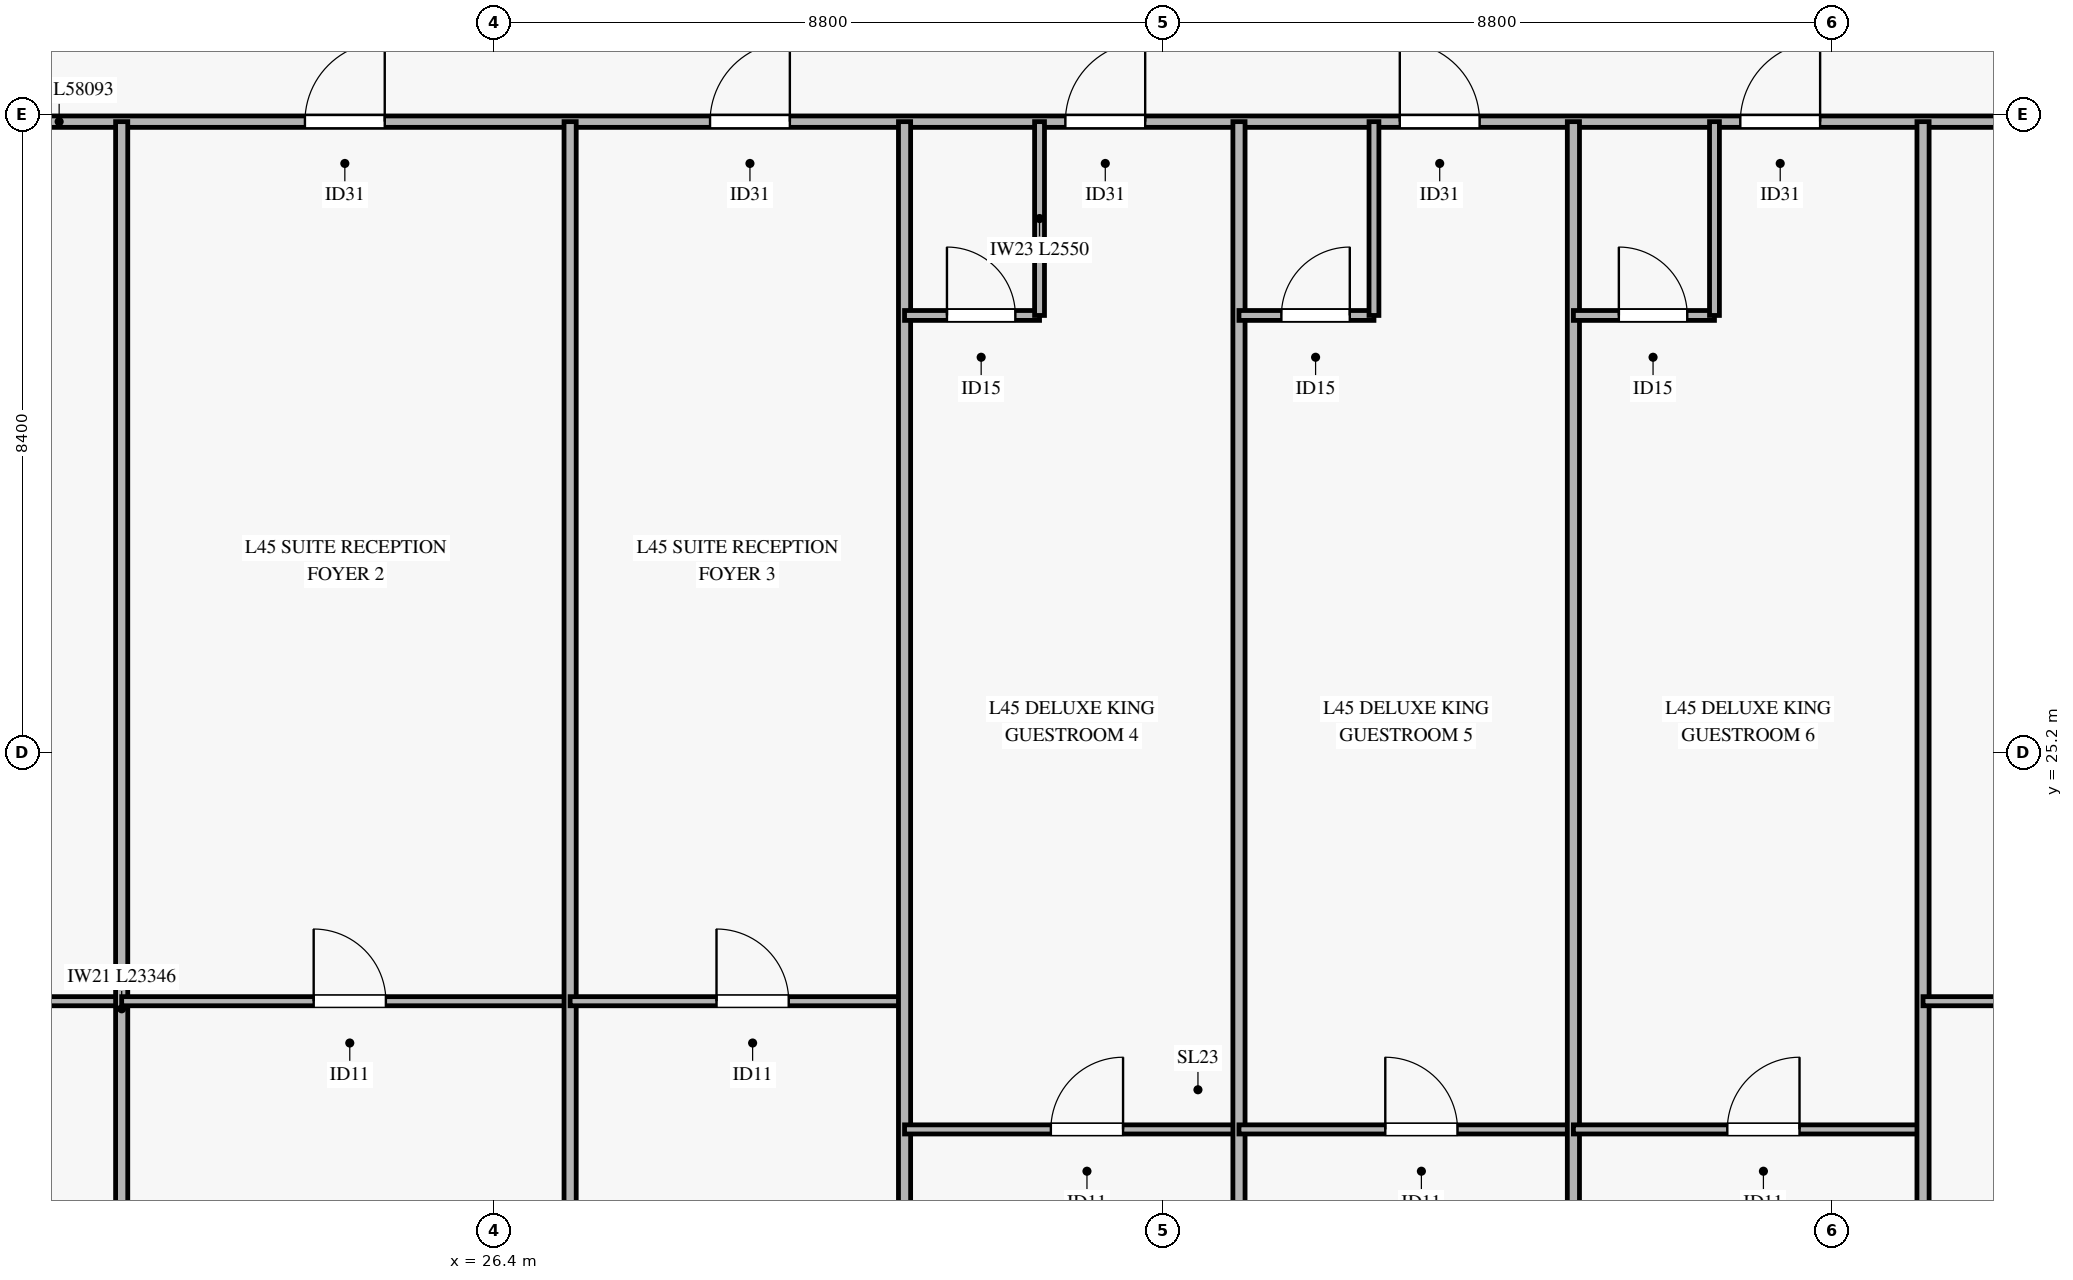
"""IFC4 building model, lengths in metres.
Left out: names, types, materials, properties, quantities, classifications, styles, units other than length and angle.
Written with IfcOpenShell. Run it as: python <this file> out.ifc"""

import sys

from ifc_helpers import new_model, si_unit, direction, frame, frame_2d, origin, place, context, subcontext, project, spatial, rectangle, extrude, source, transform, mapped, element, fill, save


model = new_model("IFC4")
c1 = context("Model", 3, precision=1e-05, world=origin(), true_north=direction((0.0, 1.0)))
c2 = subcontext(c1, "Body", "Model", "MODEL_VIEW")
j1 = project(units=[si_unit("LENGTHUNIT", "METRE"), si_unit("PLANEANGLEUNIT", "RADIAN")], contexts=[c1])
p1 = place(None, origin())
s1 = spatial("IfcSite", under=j1, at=p1, CompositionType="ELEMENT")
p2 = place(p1, origin())
s2 = spatial("IfcBuilding", under=s1, at=p2, CompositionType="ELEMENT")
p3 = place(p2, frame((0.0, 0.0, 180.7)))
s3 = spatial("IfcBuildingStorey", under=s2, at=p3, CompositionType="ELEMENT", Elevation=180.7)
p4 = place(p3, frame((6.154, 33.5, 0.0), z_axis=(0.0, 0.0, 1.0), x_axis=(1.0, 0.0, 0.0)))
e1 = element("IfcWall", 1, at=p4, inside=s3, PredefinedType="PARTITIONING", context=c2, shape_type="SweptSolid", body=[
    extrude(rectangle(XDim=58.093, YDim=0.15, at=frame_2d((29.046, 0.0))), origin(), (0.0, 0.0, 1.0), 2.455),
])
p5 = place(p4, frame((6.125, 0.0, 0.0)))
e2 = element("IfcOpeningElement", 2, at=p5, cuts=e1, PredefinedType="OPENING", context=c2, shape_type="SweptSolid", body=[
    extrude(rectangle(XDim=1.05, YDim=2.15, at=frame_2d((0.525, 1.075))), frame((0.0, 0.085, 0.0), z_axis=(0.0, -1.0, 0.0), x_axis=(1.0, 0.0, 0.0)), (0.0, 0.0, 1.0), 0.17),
])
p6 = place(p4, frame((17.757, 0.0, 0.0)))
e3 = element("IfcOpeningElement", 3, at=p6, cuts=e1, PredefinedType="OPENING", context=c2, shape_type="SweptSolid", body=[
    extrude(rectangle(XDim=1.05, YDim=2.15, at=frame_2d((0.525, 1.075))), frame((0.0, 0.085, 0.0), z_axis=(0.0, -1.0, 0.0), x_axis=(1.0, 0.0, 0.0)), (0.0, 0.0, 1.0), 0.17),
])
p7 = place(p4, frame((23.087, 0.0, 0.0)))
e4 = element("IfcOpeningElement", 4, at=p7, cuts=e1, PredefinedType="OPENING", context=c2, shape_type="SweptSolid", body=[
    extrude(rectangle(XDim=1.05, YDim=2.15, at=frame_2d((0.525, 1.075))), frame((0.0, 0.085, 0.0), z_axis=(0.0, -1.0, 0.0), x_axis=(1.0, 0.0, 0.0)), (0.0, 0.0, 1.0), 0.17),
])
p8 = place(p4, frame((27.762, 0.0, 0.0)))
e5 = element("IfcOpeningElement", 5, at=p8, cuts=e1, PredefinedType="OPENING", context=c2, shape_type="SweptSolid", body=[
    extrude(rectangle(XDim=1.05, YDim=2.15, at=frame_2d((0.525, 1.075))), frame((0.0, 0.085, 0.0), z_axis=(0.0, -1.0, 0.0), x_axis=(1.0, 0.0, 0.0)), (0.0, 0.0, 1.0), 0.17),
])
p9 = place(p4, frame((32.162, 0.0, 0.0)))
e6 = element("IfcOpeningElement", 6, at=p9, cuts=e1, PredefinedType="OPENING", context=c2, shape_type="SweptSolid", body=[
    extrude(rectangle(XDim=1.05, YDim=2.15, at=frame_2d((0.525, 1.075))), frame((0.0, 0.085, 0.0), z_axis=(0.0, -1.0, 0.0), x_axis=(1.0, 0.0, 0.0)), (0.0, 0.0, 1.0), 0.17),
])
p10 = place(p4, frame((36.642, 0.0, 0.0)))
e7 = element("IfcOpeningElement", 7, at=p10, cuts=e1, PredefinedType="OPENING", context=c2, shape_type="SweptSolid", body=[
    extrude(rectangle(XDim=1.05, YDim=2.15, at=frame_2d((0.525, 1.075))), frame((0.0, 0.085, 0.0), z_axis=(0.0, -1.0, 0.0), x_axis=(1.0, 0.0, 0.0)), (0.0, 0.0, 1.0), 0.17),
])
p11 = place(p4, frame((46.377, 0.0, 0.0)))
e8 = element("IfcOpeningElement", 8, at=p11, cuts=e1, PredefinedType="OPENING", context=c2, shape_type="SweptSolid", body=[
    extrude(rectangle(XDim=1.05, YDim=2.15, at=frame_2d((0.525, 1.075))), frame((0.0, 0.085, 0.0), z_axis=(0.0, -1.0, 0.0), x_axis=(1.0, 0.0, 0.0)), (0.0, 0.0, 1.0), 0.17),
])
p12 = place(p3, frame((6.154, 21.927, 0.0), z_axis=(0.0, 0.0, 1.0), x_axis=(1.0, 0.0, 0.0)))
e9 = element("IfcWall", 9, at=p12, inside=s3, PredefinedType="PARTITIONING", context=c2, shape_type="SweptSolid", body=[
    extrude(rectangle(XDim=15.346, YDim=0.12, at=frame_2d((7.673, 0.0))), origin(), (0.0, 0.0, 1.0), 2.455),
])
p13 = place(p12, frame((6.424, 0.0, 0.0)))
e10 = element("IfcOpeningElement", 10, at=p13, cuts=e9, PredefinedType="OPENING", context=c2, shape_type="SweptSolid", body=[
    extrude(rectangle(XDim=0.95, YDim=2.1, at=frame_2d((0.475, 1.05))), frame((0.0, 0.07, 0.0), z_axis=(0.0, -1.0, 0.0), x_axis=(1.0, 0.0, 0.0)), (0.0, 0.0, 1.0), 0.14),
])
p14 = place(p3, frame((21.5, 10.154, 0.0), z_axis=(0.0, 0.0, 1.0), x_axis=(0.0, 1.0, 0.0)))
e11 = element("IfcWall", 11, at=p14, inside=s3, PredefinedType="PARTITIONING", context=c2, shape_type="SweptSolid", body=[
    extrude(rectangle(XDim=23.346, YDim=0.16, at=frame_2d((11.673, 0.0))), origin(), (0.0, 0.0, 1.0), 2.755),
])
p15 = place(p3, frame((21.5, 21.927, 0.0), z_axis=(0.0, 0.0, 1.0), x_axis=(1.0, 0.0, 0.0)))
e12 = element("IfcWall", 12, at=p15, inside=s3, PredefinedType="PARTITIONING", context=c2, shape_type="SweptSolid", body=[
    extrude(rectangle(XDim=5.9, YDim=0.12, at=frame_2d((2.95, 0.0))), origin(), (0.0, 0.0, 1.0), 3.27),
])
p16 = place(p15, frame((2.526, 0.0, 0.0)))
e13 = element("IfcOpeningElement", 13, at=p16, cuts=e12, PredefinedType="OPENING", context=c2, shape_type="SweptSolid", body=[
    extrude(rectangle(XDim=0.95, YDim=2.1, at=frame_2d((0.475, 1.05))), frame((0.0, 0.07, 0.0), z_axis=(0.0, -1.0, 0.0), x_axis=(1.0, 0.0, 0.0)), (0.0, 0.0, 1.0), 0.14),
])
p17 = place(p3, frame((27.4, 10.154, 0.0), z_axis=(0.0, 0.0, 1.0), x_axis=(0.0, 1.0, 0.0)))
e14 = element("IfcWall", 14, at=p17, inside=s3, PredefinedType="PARTITIONING", context=c2, shape_type="SweptSolid", body=[
    extrude(rectangle(XDim=23.346, YDim=0.16, at=frame_2d((11.673, 0.0))), origin(), (0.0, 0.0, 1.0), 2.755),
])
p18 = place(p3, frame((27.4, 21.927, 0.0), z_axis=(0.0, 0.0, 1.0), x_axis=(1.0, 0.0, 0.0)))
e15 = element("IfcWall", 15, at=p18, inside=s3, PredefinedType="PARTITIONING", context=c2, shape_type="SweptSolid", body=[
    extrude(rectangle(XDim=4.4, YDim=0.12, at=frame_2d((2.2, 0.0))), origin(), (0.0, 0.0, 1.0), 2.455),
])
p19 = place(p18, frame((1.926, 0.0, 0.0)))
e16 = element("IfcOpeningElement", 16, at=p19, cuts=e15, PredefinedType="OPENING", context=c2, shape_type="SweptSolid", body=[
    extrude(rectangle(XDim=0.95, YDim=2.1, at=frame_2d((0.475, 1.05))), frame((0.0, 0.07, 0.0), z_axis=(0.0, -1.0, 0.0), x_axis=(1.0, 0.0, 0.0)), (0.0, 0.0, 1.0), 0.14),
])
p20 = place(p3, frame((31.8, 10.154, 0.0), z_axis=(0.0, 0.0, 1.0), x_axis=(0.0, 1.0, 0.0)))
e17 = element("IfcWall", 17, at=p20, inside=s3, PredefinedType="PARTITIONING", context=c2, shape_type="SweptSolid", body=[
    extrude(rectangle(XDim=23.346, YDim=0.16, at=frame_2d((11.673, 0.0))), origin(), (0.0, 0.0, 1.0), 2.755),
])
p21 = place(p3, frame((31.8, 30.95, 0.0), z_axis=(0.0, 0.0, 1.0), x_axis=(1.0, 0.0, 0.0)))
e18 = element("IfcWall", 18, at=p21, inside=s3, PredefinedType="PARTITIONING", context=c2, shape_type="SweptSolid", body=[
    extrude(rectangle(XDim=1.776, YDim=0.13, at=frame_2d((0.888, 0.0))), origin(), (0.0, 0.0, 1.0), 3.27),
])
p22 = place(p21, frame((0.558, 0.0, 0.0)))
e19 = element("IfcOpeningElement", 19, at=p22, cuts=e18, PredefinedType="OPENING", context=c2, shape_type="SweptSolid", body=[
    extrude(rectangle(XDim=0.9, YDim=2.1, at=frame_2d((0.45, 1.05))), frame((0.0, 0.075, 0.0), z_axis=(0.0, -1.0, 0.0), x_axis=(1.0, 0.0, 0.0)), (0.0, 0.0, 1.0), 0.15),
])
p23 = place(p3, frame((33.576, 30.95, 0.0), z_axis=(0.0, 0.0, 1.0), x_axis=(0.0, 1.0, 0.0)))
e20 = element("IfcWall", 20, at=p23, inside=s3, PredefinedType="PARTITIONING", context=c2, shape_type="SweptSolid", body=[
    extrude(rectangle(XDim=2.55, YDim=0.13, at=frame_2d((1.275, 0.0))), origin(), (0.0, 0.0, 1.0), 2.805),
])
p24 = place(p3, frame((31.8, 20.24, 0.0), z_axis=(0.0, 0.0, 1.0), x_axis=(1.0, 0.0, 0.0)))
e21 = element("IfcWall", 21, at=p24, inside=s3, PredefinedType="PARTITIONING", context=c2, shape_type="SweptSolid", body=[
    extrude(rectangle(XDim=4.4, YDim=0.12, at=frame_2d((2.2, 0.0))), origin(), (0.0, 0.0, 1.0), 3.27),
])
p25 = place(p24, frame((1.925, 0.0, 0.0)))
e22 = element("IfcOpeningElement", 22, at=p25, cuts=e21, PredefinedType="OPENING", context=c2, shape_type="SweptSolid", body=[
    extrude(rectangle(XDim=0.95, YDim=2.1, at=frame_2d((0.475, 1.05))), frame((0.0, 0.07, 0.0), z_axis=(0.0, -1.0, 0.0), x_axis=(1.0, 0.0, 0.0)), (0.0, 0.0, 1.0), 0.14),
])
p26 = place(p3, frame((36.2, 10.154, 0.0), z_axis=(0.0, 0.0, 1.0), x_axis=(0.0, 1.0, 0.0)))
e23 = element("IfcWall", 23, at=p26, inside=s3, PredefinedType="PARTITIONING", context=c2, shape_type="SweptSolid", body=[
    extrude(rectangle(XDim=23.346, YDim=0.16, at=frame_2d((11.673, 0.0))), origin(), (0.0, 0.0, 1.0), 2.755),
])
p27 = place(p3, frame((36.2, 30.95, 0.0), z_axis=(0.0, 0.0, 1.0), x_axis=(1.0, 0.0, 0.0)))
e24 = element("IfcWall", 24, at=p27, inside=s3, PredefinedType="PARTITIONING", context=c2, shape_type="SweptSolid", body=[
    extrude(rectangle(XDim=1.776, YDim=0.13, at=frame_2d((0.888, 0.0))), origin(), (0.0, 0.0, 1.0), 2.455),
])
p28 = place(p27, frame((0.558, 0.0, 0.0)))
e25 = element("IfcOpeningElement", 25, at=p28, cuts=e24, PredefinedType="OPENING", context=c2, shape_type="SweptSolid", body=[
    extrude(rectangle(XDim=0.9, YDim=2.1, at=frame_2d((0.45, 1.05))), frame((0.0, 0.075, 0.0), z_axis=(0.0, -1.0, 0.0), x_axis=(1.0, 0.0, 0.0)), (0.0, 0.0, 1.0), 0.15),
])
p29 = place(p3, frame((37.976, 30.95, 0.0), z_axis=(0.0, 0.0, 1.0), x_axis=(0.0, 1.0, 0.0)))
e26 = element("IfcWall", 26, at=p29, inside=s3, PredefinedType="PARTITIONING", context=c2, shape_type="SweptSolid", body=[
    extrude(rectangle(XDim=2.55, YDim=0.13, at=frame_2d((1.275, 0.0))), origin(), (0.0, 0.0, 1.0), 2.805),
])
p30 = place(p3, frame((36.2, 20.24, 0.0), z_axis=(0.0, 0.0, 1.0), x_axis=(1.0, 0.0, 0.0)))
e27 = element("IfcWall", 27, at=p30, inside=s3, PredefinedType="PARTITIONING", context=c2, shape_type="SweptSolid", body=[
    extrude(rectangle(XDim=4.4, YDim=0.12, at=frame_2d((2.2, 0.0))), origin(), (0.0, 0.0, 1.0), 2.455),
])
p31 = place(p30, frame((1.925, 0.0, 0.0)))
e28 = element("IfcOpeningElement", 28, at=p31, cuts=e27, PredefinedType="OPENING", context=c2, shape_type="SweptSolid", body=[
    extrude(rectangle(XDim=0.95, YDim=2.1, at=frame_2d((0.475, 1.05))), frame((0.0, 0.07, 0.0), z_axis=(0.0, -1.0, 0.0), x_axis=(1.0, 0.0, 0.0)), (0.0, 0.0, 1.0), 0.14),
])
p32 = place(p3, frame((40.6, 10.154, 0.0), z_axis=(0.0, 0.0, 1.0), x_axis=(0.0, 1.0, 0.0)))
e29 = element("IfcWall", 29, at=p32, inside=s3, PredefinedType="PARTITIONING", context=c2, shape_type="SweptSolid", body=[
    extrude(rectangle(XDim=23.346, YDim=0.16, at=frame_2d((11.673, 0.0))), origin(), (0.0, 0.0, 1.0), 2.755),
])
p33 = place(p3, frame((40.6, 30.95, 0.0), z_axis=(0.0, 0.0, 1.0), x_axis=(1.0, 0.0, 0.0)))
e30 = element("IfcWall", 30, at=p33, inside=s3, PredefinedType="PARTITIONING", context=c2, shape_type="SweptSolid", body=[
    extrude(rectangle(XDim=1.856, YDim=0.13, at=frame_2d((0.928, 0.0))), origin(), (0.0, 0.0, 1.0), 3.27),
])
p34 = place(p33, frame((0.598, 0.0, 0.0)))
e31 = element("IfcOpeningElement", 31, at=p34, cuts=e30, PredefinedType="OPENING", context=c2, shape_type="SweptSolid", body=[
    extrude(rectangle(XDim=0.9, YDim=2.1, at=frame_2d((0.45, 1.05))), frame((0.0, 0.075, 0.0), z_axis=(0.0, -1.0, 0.0), x_axis=(1.0, 0.0, 0.0)), (0.0, 0.0, 1.0), 0.15),
])
p35 = place(p3, frame((42.456, 30.95, 0.0), z_axis=(0.0, 0.0, 1.0), x_axis=(0.0, 1.0, 0.0)))
e32 = element("IfcWall", 32, at=p35, inside=s3, PredefinedType="PARTITIONING", context=c2, shape_type="SweptSolid", body=[
    extrude(rectangle(XDim=2.55, YDim=0.13, at=frame_2d((1.275, 0.0))), origin(), (0.0, 0.0, 1.0), 2.805),
])
p36 = place(p3, frame((40.6, 20.24, 0.0), z_axis=(0.0, 0.0, 1.0), x_axis=(1.0, 0.0, 0.0)))
e33 = element("IfcWall", 33, at=p36, inside=s3, PredefinedType="PARTITIONING", context=c2, shape_type="SweptSolid", body=[
    extrude(rectangle(XDim=4.6, YDim=0.12, at=frame_2d((2.3, 0.0))), origin(), (0.0, 0.0, 1.0), 2.455),
])
p37 = place(p36, frame((2.025, 0.0, 0.0)))
e34 = element("IfcOpeningElement", 34, at=p37, cuts=e33, PredefinedType="OPENING", context=c2, shape_type="SweptSolid", body=[
    extrude(rectangle(XDim=0.95, YDim=2.1, at=frame_2d((0.475, 1.05))), frame((0.0, 0.07, 0.0), z_axis=(0.0, -1.0, 0.0), x_axis=(1.0, 0.0, 0.0)), (0.0, 0.0, 1.0), 0.14),
])
p38 = place(p3, frame((45.2, 10.154, 0.0), z_axis=(0.0, 0.0, 1.0), x_axis=(0.0, 1.0, 0.0)))
e35 = element("IfcWall", 35, at=p38, inside=s3, PredefinedType="PARTITIONING", context=c2, shape_type="SweptSolid", body=[
    extrude(rectangle(XDim=23.346, YDim=0.16, at=frame_2d((11.673, 0.0))), origin(), (0.0, 0.0, 1.0), 2.755),
])
p39 = place(p3, frame((45.2, 21.927, 0.0), z_axis=(0.0, 0.0, 1.0), x_axis=(1.0, 0.0, 0.0)))
e36 = element("IfcWall", 36, at=p39, inside=s3, PredefinedType="PARTITIONING", context=c2, shape_type="SweptSolid", body=[
    extrude(rectangle(XDim=19.047, YDim=0.12, at=frame_2d((9.523, 0.0))), origin(), (0.0, 0.0, 1.0), 2.455),
])
p40 = place(p39, frame((7.705, 0.0, 0.0)))
e37 = element("IfcOpeningElement", 37, at=p40, cuts=e36, PredefinedType="OPENING", context=c2, shape_type="SweptSolid", body=[
    extrude(rectangle(XDim=0.95, YDim=2.1, at=frame_2d((0.475, 1.05))), frame((0.0, 0.07, 0.0), z_axis=(0.0, -1.0, 0.0), x_axis=(1.0, 0.0, 0.0)), (0.0, 0.0, 1.0), 0.14),
])
m1 = source(origin(), c2, "Body", "SweptSolid", [
    extrude(rectangle(XDim=1.05, YDim=2.15, at=frame_2d((0.525, 1.075))), frame((0.0, 0.025, 0.0), z_axis=(0.0, -1.0, 0.0), x_axis=(1.0, 0.0, 0.0)), (0.0, 0.0, 1.0), 0.05),
])
p41 = place(p6, origin())
e38 = element("IfcDoor", 38, at=p41, inside=s3, OperationType="SINGLE_SWING_RIGHT", PredefinedType="DOOR", context=c2, shape_type="MappedRepresentation", body=[
    mapped(m1, transform((0.0, 0.0, 0.0), x_axis=(1.0, 0.0, 0.0), y_axis=(0.0, 1.0, 0.0), z_axis=(0.0, 0.0, 1.0), scale=1.0)),
])
fill(e3, e38)
m2 = source(origin(), c2, "Body", "SweptSolid", [
    extrude(rectangle(XDim=0.95, YDim=2.1, at=frame_2d((0.475, 1.05))), frame((0.0, 0.025, 0.0), z_axis=(0.0, -1.0, 0.0), x_axis=(1.0, 0.0, 0.0)), (0.0, 0.0, 1.0), 0.05),
])
p42 = place(p16, origin())
e39 = element("IfcDoor", 39, at=p42, inside=s3, OperationType="SINGLE_SWING_LEFT", PredefinedType="DOOR", context=c2, shape_type="MappedRepresentation", body=[
    mapped(m2, transform((0.0, 0.0, 0.0), x_axis=(1.0, 0.0, 0.0), y_axis=(0.0, 1.0, 0.0), z_axis=(0.0, 0.0, 1.0), scale=1.0)),
])
fill(e13, e39)
p43 = place(p7, origin())
e40 = element("IfcDoor", 40, at=p43, inside=s3, OperationType="SINGLE_SWING_RIGHT", PredefinedType="DOOR", context=c2, shape_type="MappedRepresentation", body=[
    mapped(m1, transform((0.0, 0.0, 0.0), x_axis=(1.0, 0.0, 0.0), y_axis=(0.0, 1.0, 0.0), z_axis=(0.0, 0.0, 1.0), scale=1.0)),
])
fill(e4, e40)
p44 = place(p19, origin())
e41 = element("IfcDoor", 41, at=p44, inside=s3, OperationType="SINGLE_SWING_LEFT", PredefinedType="DOOR", context=c2, shape_type="MappedRepresentation", body=[
    mapped(m2, transform((0.0, 0.0, 0.0), x_axis=(1.0, 0.0, 0.0), y_axis=(0.0, 1.0, 0.0), z_axis=(0.0, 0.0, 1.0), scale=1.0)),
])
fill(e16, e41)
p45 = place(p8, origin())
e42 = element("IfcDoor", 42, at=p45, inside=s3, OperationType="SINGLE_SWING_RIGHT", PredefinedType="DOOR", context=c2, shape_type="MappedRepresentation", body=[
    mapped(m1, transform((0.0, 0.0, 0.0), x_axis=(1.0, 0.0, 0.0), y_axis=(0.0, 1.0, 0.0), z_axis=(0.0, 0.0, 1.0), scale=1.0)),
])
fill(e5, e42)
m3 = source(origin(), c2, "Body", "SweptSolid", [
    extrude(rectangle(XDim=0.9, YDim=2.1, at=frame_2d((0.45, 1.05))), frame((0.0, 0.025, 0.0), z_axis=(0.0, -1.0, 0.0), x_axis=(1.0, 0.0, 0.0)), (0.0, 0.0, 1.0), 0.05),
])
p46 = place(p22, origin())
e43 = element("IfcDoor", 43, at=p46, inside=s3, OperationType="SINGLE_SWING_LEFT", PredefinedType="DOOR", context=c2, shape_type="MappedRepresentation", body=[
    mapped(m3, transform((0.0, 0.0, 0.0), x_axis=(1.0, 0.0, 0.0), y_axis=(0.0, 1.0, 0.0), z_axis=(0.0, 0.0, 1.0), scale=1.0)),
])
fill(e19, e43)
p47 = place(p25, origin())
e44 = element("IfcDoor", 44, at=p47, inside=s3, OperationType="SINGLE_SWING_RIGHT", PredefinedType="DOOR", context=c2, shape_type="MappedRepresentation", body=[
    mapped(m2, transform((0.0, 0.0, 0.0), x_axis=(1.0, 0.0, 0.0), y_axis=(0.0, 1.0, 0.0), z_axis=(0.0, 0.0, 1.0), scale=1.0)),
])
fill(e22, e44)
p48 = place(p9, origin())
e45 = element("IfcDoor", 45, at=p48, inside=s3, OperationType="SINGLE_SWING_LEFT", PredefinedType="DOOR", context=c2, shape_type="MappedRepresentation", body=[
    mapped(m1, transform((0.0, 0.0, 0.0), x_axis=(1.0, 0.0, 0.0), y_axis=(0.0, 1.0, 0.0), z_axis=(0.0, 0.0, 1.0), scale=1.0)),
])
fill(e6, e45)
p49 = place(p28, origin())
e46 = element("IfcDoor", 46, at=p49, inside=s3, OperationType="SINGLE_SWING_RIGHT", PredefinedType="DOOR", context=c2, shape_type="MappedRepresentation", body=[
    mapped(m3, transform((0.0, 0.0, 0.0), x_axis=(1.0, 0.0, 0.0), y_axis=(0.0, 1.0, 0.0), z_axis=(0.0, 0.0, 1.0), scale=1.0)),
])
fill(e25, e46)
p50 = place(p31, origin())
e47 = element("IfcDoor", 47, at=p50, inside=s3, OperationType="SINGLE_SWING_LEFT", PredefinedType="DOOR", context=c2, shape_type="MappedRepresentation", body=[
    mapped(m2, transform((0.0, 0.0, 0.0), x_axis=(1.0, 0.0, 0.0), y_axis=(0.0, 1.0, 0.0), z_axis=(0.0, 0.0, 1.0), scale=1.0)),
])
fill(e28, e47)
p51 = place(p10, origin())
e48 = element("IfcDoor", 48, at=p51, inside=s3, OperationType="SINGLE_SWING_RIGHT", PredefinedType="DOOR", context=c2, shape_type="MappedRepresentation", body=[
    mapped(m1, transform((0.0, 0.0, 0.0), x_axis=(1.0, 0.0, 0.0), y_axis=(0.0, 1.0, 0.0), z_axis=(0.0, 0.0, 1.0), scale=1.0)),
])
fill(e7, e48)
p52 = place(p34, origin())
e49 = element("IfcDoor", 49, at=p52, inside=s3, OperationType="SINGLE_SWING_LEFT", PredefinedType="DOOR", context=c2, shape_type="MappedRepresentation", body=[
    mapped(m3, transform((0.0, 0.0, 0.0), x_axis=(1.0, 0.0, 0.0), y_axis=(0.0, 1.0, 0.0), z_axis=(0.0, 0.0, 1.0), scale=1.0)),
])
fill(e31, e49)
p53 = place(p37, origin())
e50 = element("IfcDoor", 50, at=p53, inside=s3, OperationType="SINGLE_SWING_RIGHT", PredefinedType="DOOR", context=c2, shape_type="MappedRepresentation", body=[
    mapped(m2, transform((0.0, 0.0, 0.0), x_axis=(1.0, 0.0, 0.0), y_axis=(0.0, 1.0, 0.0), z_axis=(0.0, 0.0, 1.0), scale=1.0)),
])
fill(e34, e50)
save(model, sys.argv[1])
